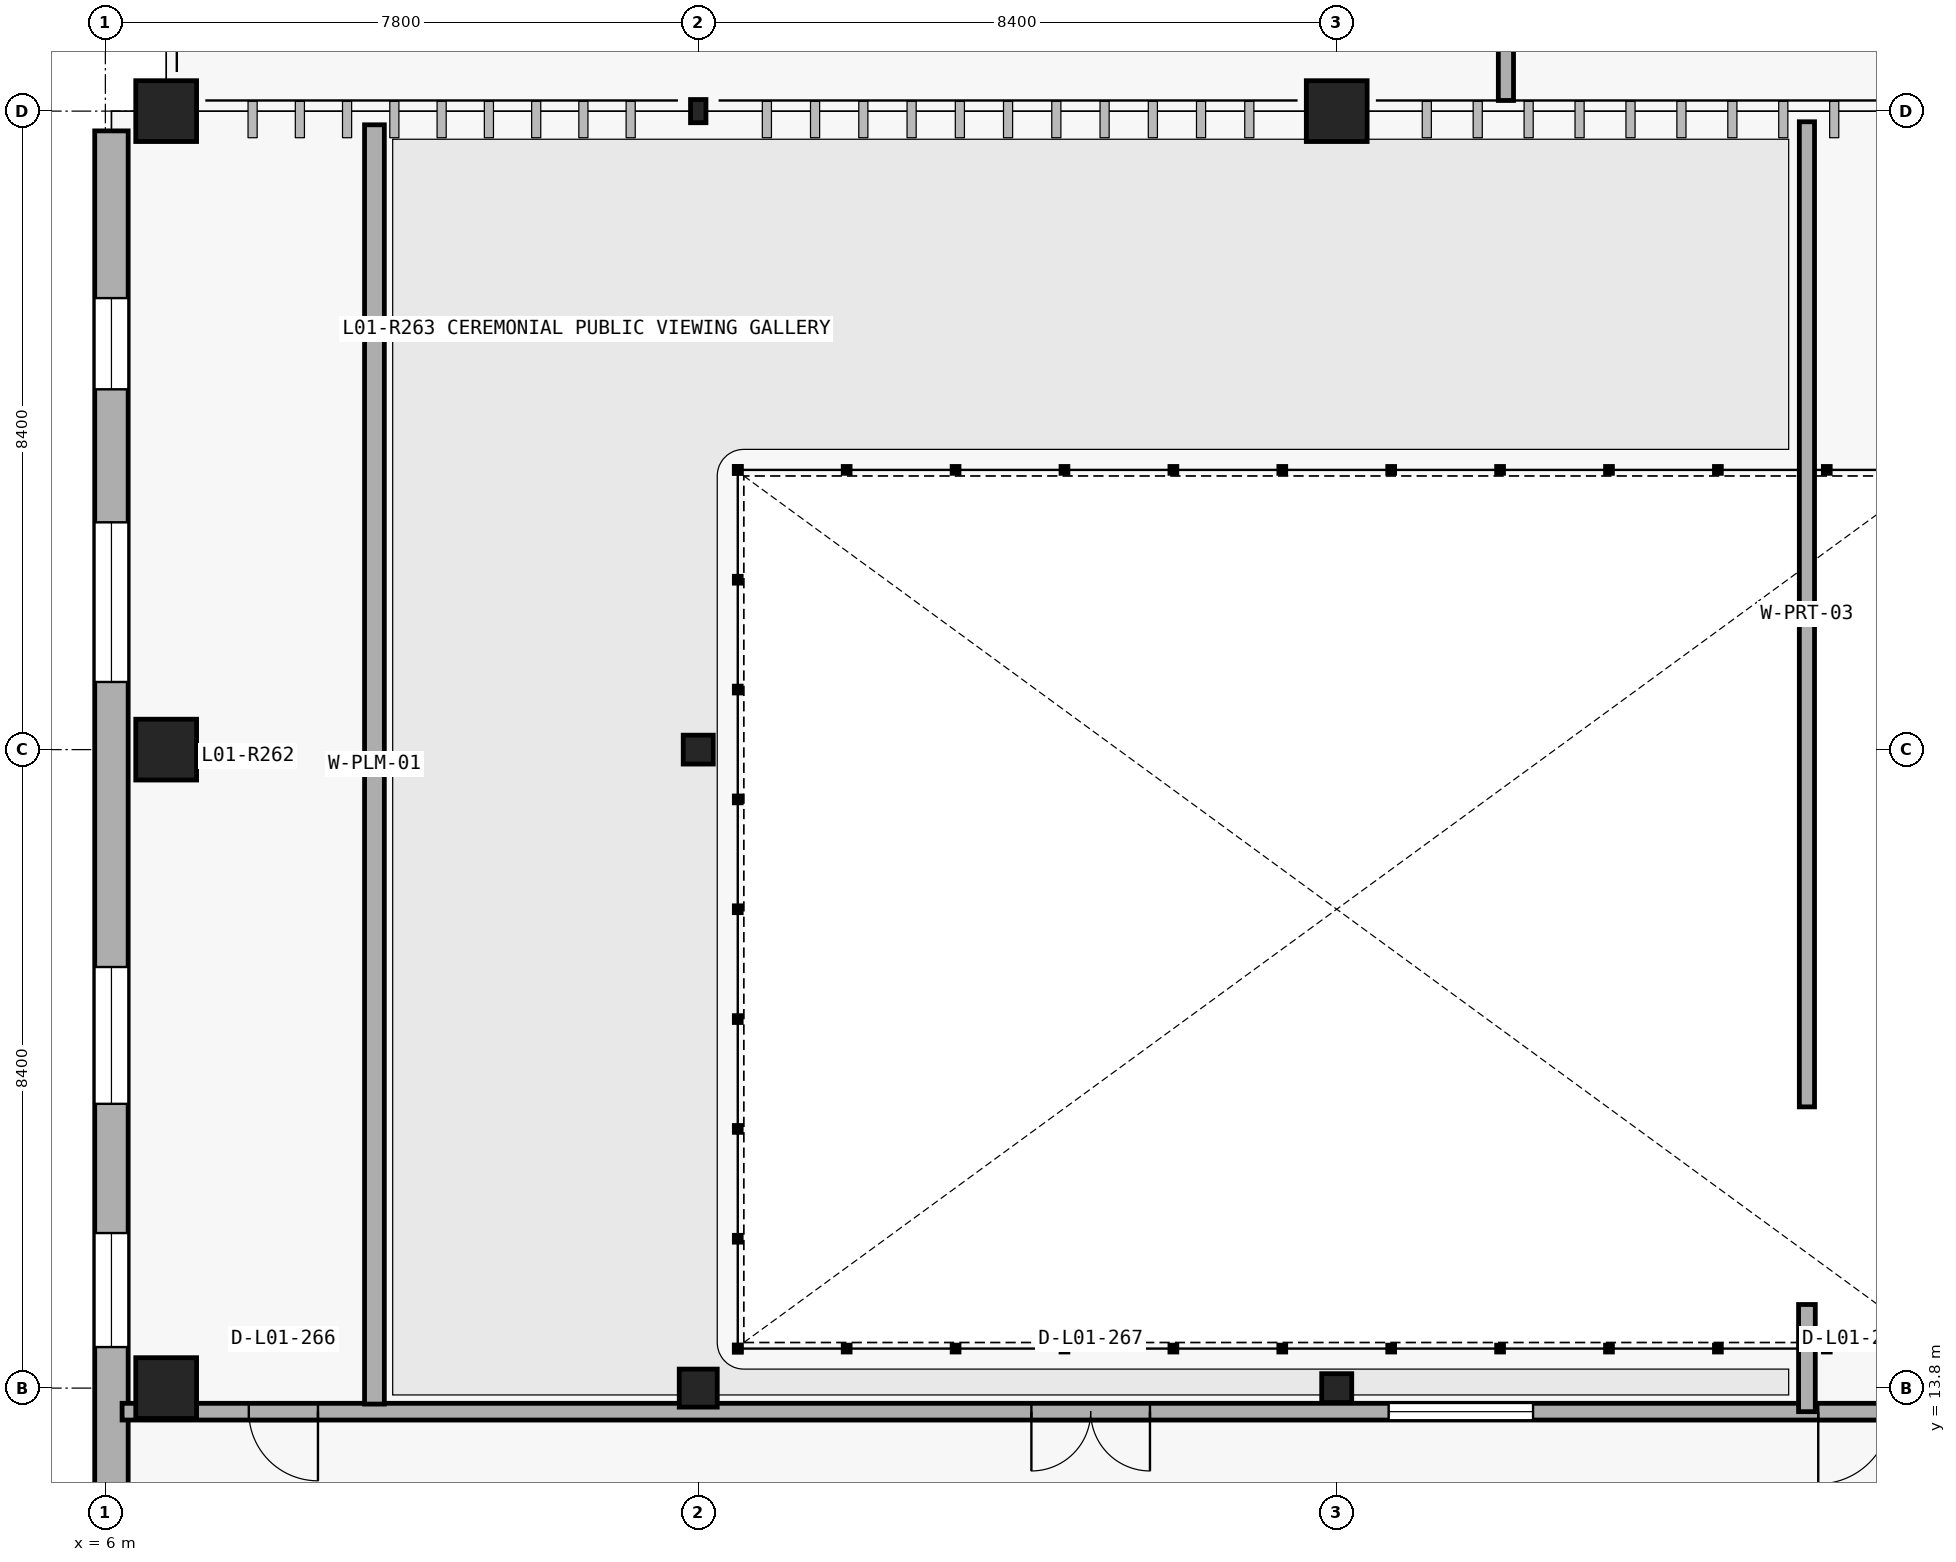
"""IFC4 building model, lengths in metres.
Left out: names, types, materials, properties, quantities, classifications, styles, units other than length and angle.
Written with IfcOpenShell. Run it as: python <this file> out.ifc"""

import sys

from ifc_helpers import new_model, si_unit, direction, frame, frame_2d, origin_with_axes, origin_2d_with_axis, place, context, subcontext, project, spatial, rectangle, hollow_rectangle, circle, i_section, extrude, element, fill, save


model = new_model("IFC4")
c1 = context("Model", 3, precision=1e-05, world=origin_with_axes(), true_north=direction((0.0, 1.0)))
c2 = subcontext(c1, "Body", "Model", "MODEL_VIEW")
j1 = project(units=[si_unit("LENGTHUNIT", "METRE"), si_unit("PLANEANGLEUNIT", "RADIAN")], contexts=[c1])
p1 = place(None, origin_with_axes())
s1 = spatial("IfcSite", under=j1, at=p1, CompositionType="ELEMENT")
p2 = place(p1, origin_with_axes())
s2 = spatial("IfcBuilding", under=s1, at=p2, CompositionType="ELEMENT")
p3 = place(p2, frame((0.0, 0.0, 5.4), z_axis=(0.0, 0.0, 1.0), x_axis=(1.0, 0.0, 0.0)))
s3 = spatial("IfcBuildingStorey", under=s2, at=p3, CompositionType="ELEMENT", Elevation=5.4)
p4 = place(None, frame((6.08, 30.34, 5.4), z_axis=(0.0, 0.0, 1.0), x_axis=(0.0, -1.0, 0.0)))
e1 = element("IfcWall", 1, at=p4, inside=s3, PredefinedType="SOLIDWALL", context=c2, shape_type="SweptSolid", body=[
    extrude(rectangle(XDim=24.0, YDim=0.44, at=frame_2d((12.0, 0.0), x_axis=(1.0, 0.0))), origin_with_axes(), (0.0, 0.0, 1.0), 5.1),
])
p5 = place(None, frame((6.08, 27.54, 6.5), z_axis=(0.0, 0.0, 1.0), x_axis=(0.0, -1.0, 0.0)))
e2 = element("IfcOpeningElement", 2, at=p5, cuts=e1, PredefinedType="OPENING", context=c2, shape_type="SweptSolid", body=[
    extrude(rectangle(XDim=1.2, YDim=3.4, at=frame_2d((0.0, 1.7), x_axis=(1.0, 0.0))), frame((0.0, 0.23, 0.0), z_axis=(0.0, -1.0, 0.0), x_axis=(1.0, 0.0, 0.0)), (0.0, 0.0, 1.0), 0.46),
])
p6 = place(None, frame((6.08, 24.14, 6.25), z_axis=(0.0, 0.0, 1.0), x_axis=(0.0, -1.0, 0.0)))
e3 = element("IfcOpeningElement", 3, at=p6, cuts=e1, PredefinedType="OPENING", context=c2, shape_type="SweptSolid", body=[
    extrude(rectangle(XDim=2.1, YDim=3.3, at=frame_2d((0.0, 1.65), x_axis=(1.0, 0.0))), frame((0.0, 0.23, 0.0), z_axis=(0.0, -1.0, 0.0), x_axis=(1.0, 0.0, 0.0)), (0.0, 0.0, 1.0), 0.46),
])
p7 = place(None, frame((6.08, 18.44, 6.3), z_axis=(0.0, 0.0, 1.0), x_axis=(0.0, -1.0, 0.0)))
e4 = element("IfcOpeningElement", 4, at=p7, cuts=e1, PredefinedType="OPENING", context=c2, shape_type="SweptSolid", body=[
    extrude(rectangle(XDim=1.8, YDim=3.0, at=frame_2d((0.0, 1.5), x_axis=(1.0, 0.0))), frame((0.0, 0.23, 0.0), z_axis=(0.0, -1.0, 0.0), x_axis=(1.0, 0.0, 0.0)), (0.0, 0.0, 1.0), 0.46),
])
p8 = place(None, frame((6.08, 15.09, 6.3), z_axis=(0.0, 0.0, 1.0), x_axis=(0.0, -1.0, 0.0)))
e5 = element("IfcOpeningElement", 5, at=p8, cuts=e1, PredefinedType="OPENING", context=c2, shape_type="SweptSolid", body=[
    extrude(rectangle(XDim=1.5, YDim=2.7, at=frame_2d((0.0, 1.35), x_axis=(1.0, 0.0))), frame((0.0, 0.23, 0.0), z_axis=(0.0, -1.0, 0.0), x_axis=(1.0, 0.0, 0.0)), (0.0, 0.0, 1.0), 0.46),
])
p9 = place(None, frame((6.22, 13.49, 5.4), z_axis=(0.0, 0.0, 1.0), x_axis=(1.0, 0.0, 0.0)))
e6 = element("IfcWall", 6, at=p9, inside=s3, PredefinedType="PARTITIONING", context=c2, shape_type="SweptSolid", body=[
    extrude(rectangle(XDim=25.037, YDim=0.22, at=frame_2d((12.518, 0.0), x_axis=(1.0, 0.0))), origin_with_axes(), (0.0, 0.0, 1.0), 5.08),
])
p10 = place(None, frame((8.342, 13.49, 5.4), z_axis=(0.0, 0.0, 1.0), x_axis=(1.0, 0.0, 0.0)))
e7 = element("IfcOpeningElement", 7, at=p10, cuts=e6, PredefinedType="OPENING", context=c2, shape_type="SweptSolid", body=[
    extrude(rectangle(XDim=0.91, YDim=2.12, at=frame_2d((0.0, 1.06), x_axis=(1.0, 0.0))), frame((0.0, 0.12, 0.0), z_axis=(0.0, -1.0, 0.0), x_axis=(1.0, 0.0, 0.0)), (0.0, 0.0, 1.0), 0.24),
])
p11 = place(None, frame((18.963, 13.49, 5.4), z_axis=(0.0, 0.0, 1.0), x_axis=(1.0, 0.0, 0.0)))
e8 = element("IfcOpeningElement", 8, at=p11, cuts=e6, PredefinedType="OPENING", context=c2, shape_type="SweptSolid", body=[
    extrude(rectangle(XDim=1.56, YDim=2.28, at=frame_2d((0.0, 1.14), x_axis=(1.0, 0.0))), frame((0.0, 0.12, 0.0), z_axis=(0.0, -1.0, 0.0), x_axis=(1.0, 0.0, 0.0)), (0.0, 0.0, 1.0), 0.24),
])
p12 = place(None, frame((29.01, 13.49, 5.4), z_axis=(0.0, 0.0, 1.0), x_axis=(1.0, 0.0, 0.0)))
e9 = element("IfcOpeningElement", 9, at=p12, cuts=e6, PredefinedType="OPENING", context=c2, shape_type="SweptSolid", body=[
    extrude(rectangle(XDim=0.95, YDim=2.16, at=frame_2d((0.0, 1.08), x_axis=(1.0, 0.0))), frame((0.0, 0.12, 0.0), z_axis=(0.0, -1.0, 0.0), x_axis=(1.0, 0.0, 0.0)), (0.0, 0.0, 1.0), 0.24),
])
p13 = place(None, frame((23.833, 13.49, 6.45), z_axis=(0.0, 0.0, 1.0), x_axis=(1.0, 0.0, 0.0)))
e10 = element("IfcOpeningElement", 10, at=p13, cuts=e6, PredefinedType="OPENING", context=c2, shape_type="SweptSolid", body=[
    extrude(rectangle(XDim=1.9, YDim=1.5, at=frame_2d((0.0, 0.75), x_axis=(1.0, 0.0))), frame((0.0, 0.12, 0.0), z_axis=(0.0, -1.0, 0.0), x_axis=(1.0, 0.0, 0.0)), (0.0, 0.0, 1.0), 0.24),
])
p14 = place(None, frame((9.54, 13.59, 5.4), z_axis=(0.0, 0.0, 1.0), x_axis=(0.0, 1.0, 0.0)))
e11 = element("IfcWall", 11, at=p14, inside=s3, PredefinedType="PLUMBINGWALL", context=c2, shape_type="SweptSolid", body=[
    extrude(rectangle(XDim=16.83, YDim=0.26, at=frame_2d((8.415, 0.0), x_axis=(1.0, 0.0))), origin_with_axes(), (0.0, 0.0, 1.0), 5.08),
])
p15 = place(None, frame((28.386, 13.49, 5.4), z_axis=(0.0, 0.0, 1.0), x_axis=(0.0, 1.0, 0.0)))
e12 = element("IfcWall", 12, at=p15, inside=s3, PredefinedType="PARTITIONING", context=c2, shape_type="SweptSolid", body=[
    extrude(rectangle(XDim=1.41, YDim=0.22, at=frame_2d((0.705, 0.0), x_axis=(1.0, 0.0))), origin_with_axes(), (0.0, 0.0, 1.0), 5.08),
])
p16 = place(None, frame((28.386, 17.5, 5.4), z_axis=(0.0, 0.0, 1.0), x_axis=(0.0, 1.0, 0.0)))
e13 = element("IfcWall", 13, at=p16, inside=s3, PredefinedType="PARTITIONING", context=c2, shape_type="SweptSolid", body=[
    extrude(rectangle(XDim=12.96, YDim=0.2, at=frame_2d((6.48, 0.0), x_axis=(1.0, 0.0))), origin_with_axes(), (0.0, 0.0, 1.0), 5.08),
])
p17 = place(None, frame((24.426, 30.74, 5.4), z_axis=(0.0, 0.0, 1.0), x_axis=(0.0, 1.0, 0.0)))
e14 = element("IfcWall", 14, at=p17, inside=s3, PredefinedType="PARTITIONING", context=c2, shape_type="SweptSolid", body=[
    extrude(rectangle(XDim=4.51, YDim=0.2, at=frame_2d((2.255, 0.0), x_axis=(1.0, 0.0))), origin_with_axes(), (0.0, 0.0, 1.0), 5.08),
])
for number, where, z_axis, x_axis in (
    (15, (6.8, 13.8, 5.4), (0.0, 0.0, 1.0), (1.0, 0.0, 0.0)),
    (16, (6.8, 22.2, 5.4), (0.0, 0.0, 1.0), (1.0, 0.0, 0.0)),
    (17, (6.8, 30.6, 5.4), (0.0, 0.0, 1.0), (1.0, 0.0, 0.0)),
):
    element("IfcColumn", number, at=place(None, frame(where, z_axis=z_axis, x_axis=x_axis)), inside=s3, PredefinedType="COLUMN", context=c2, shape_type="SweptSolid", body=[
        extrude(circle(Radius=0.4, at=origin_2d_with_axis()), origin_with_axes(), (0.0, 0.0, 1.0), 5.4),
    ])
p18 = place(None, frame((13.8, 13.8, 5.4), z_axis=(0.0, 0.0, 1.0), x_axis=(1.0, 0.0, 0.0)))
e18 = element("IfcColumn", 18, at=p18, inside=s3, PredefinedType="COLUMN", context=c2, shape_type="SweptSolid", body=[
    extrude(i_section(OverallWidth=0.5, OverallDepth=0.5, WebThickness=0.022, FlangeThickness=0.036, at=origin_2d_with_axis()), origin_with_axes(), (0.0, 0.0, 1.0), 5.4),
])
p19 = place(None, frame((13.8, 22.2, 5.4), z_axis=(0.0, 0.0, 1.0), x_axis=(1.0, 0.0, 0.0)))
e19 = element("IfcColumn", 19, at=p19, inside=s3, PredefinedType="COLUMN", context=c2, shape_type="SweptSolid", body=[
    extrude(i_section(OverallWidth=0.395, OverallDepth=0.38, WebThickness=0.019, FlangeThickness=0.03, at=origin_2d_with_axis()), origin_with_axes(), (0.0, 0.0, 1.0), 5.4),
])
p20 = place(None, frame((13.8, 30.6, 5.4), z_axis=(0.0, 0.0, 1.0), x_axis=(1.0, 0.0, 0.0)))
e20 = element("IfcColumn", 20, at=p20, inside=s3, PredefinedType="COLUMN", context=c2, shape_type="SweptSolid", body=[
    extrude(hollow_rectangle(XDim=0.203, YDim=0.305, WallThickness=0.013, InnerFilletRadius=0.025, OuterFilletRadius=0.013, at=origin_2d_with_axis()), origin_with_axes(), (0.0, 0.0, 1.0), 5.4),
])
p21 = place(None, frame((22.2, 13.8, 5.4), z_axis=(0.0, 0.0, 1.0), x_axis=(1.0, 0.0, 0.0)))
e21 = element("IfcColumn", 21, at=p21, inside=s3, PredefinedType="COLUMN", context=c2, shape_type="SweptSolid", body=[
    extrude(i_section(OverallWidth=0.395, OverallDepth=0.38, WebThickness=0.019, FlangeThickness=0.03, at=origin_2d_with_axis()), origin_with_axes(), (0.0, 0.0, 1.0), 5.4),
])
p22 = place(None, frame((22.2, 30.6, 5.4), z_axis=(0.0, 0.0, 1.0), x_axis=(1.0, 0.0, 0.0)))
e22 = element("IfcColumn", 22, at=p22, inside=s3, PredefinedType="COLUMN", context=c2, shape_type="SweptSolid", body=[
    extrude(circle(Radius=0.4, at=origin_2d_with_axis()), origin_with_axes(), (0.0, 0.0, 1.0), 5.4),
])
p23 = place(None, frame((8.342, 13.49, 5.4), z_axis=(0.0, 0.0, 1.0), x_axis=(-1.0, 0.0, 0.0)))
e23 = element("IfcDoor", 23, at=p23, inside=s3, OperationType="SINGLE_SWING_RIGHT", PredefinedType="DOOR", context=c2, shape_type="SweptSolid", body=[
    extrude(rectangle(XDim=0.91, YDim=2.12, at=frame_2d((0.0, 1.06), x_axis=(1.0, 0.0))), frame((0.0, 0.04, 0.0), z_axis=(0.0, -1.0, 0.0), x_axis=(1.0, 0.0, 0.0)), (0.0, 0.0, 1.0), 0.08),
])
fill(e7, e23)
p24 = place(None, frame((18.963, 13.49, 5.4), z_axis=(0.0, 0.0, 1.0), x_axis=(-1.0, 0.0, 0.0)))
e24 = element("IfcDoor", 24, at=p24, inside=s3, OperationType="DOUBLE_DOOR_SINGLE_SWING", PredefinedType="DOOR", context=c2, shape_type="SweptSolid", body=[
    extrude(rectangle(XDim=1.56, YDim=2.28, at=frame_2d((0.0, 1.14), x_axis=(1.0, 0.0))), frame((0.0, 0.04, 0.0), z_axis=(0.0, -1.0, 0.0), x_axis=(1.0, 0.0, 0.0)), (0.0, 0.0, 1.0), 0.08),
])
fill(e8, e24)
p25 = place(None, frame((29.01, 13.49, 5.4), z_axis=(0.0, 0.0, 1.0), x_axis=(-1.0, 0.0, 0.0)))
e25 = element("IfcDoor", 25, at=p25, inside=s3, OperationType="SINGLE_SWING_LEFT", PredefinedType="DOOR", context=c2, shape_type="SweptSolid", body=[
    extrude(rectangle(XDim=0.95, YDim=2.16, at=frame_2d((0.0, 1.08), x_axis=(1.0, 0.0))), frame((0.0, 0.04, 0.0), z_axis=(0.0, -1.0, 0.0), x_axis=(1.0, 0.0, 0.0)), (0.0, 0.0, 1.0), 0.08),
])
fill(e9, e25)
p26 = place(None, frame((6.08, 27.54, 6.5), z_axis=(0.0, 0.0, 1.0), x_axis=(0.0, -1.0, 0.0)))
e26 = element("IfcWindow", 26, at=p26, inside=s3, PartitioningType="SINGLE_PANEL", PredefinedType="WINDOW", context=c2, shape_type="SweptSolid", body=[
    extrude(rectangle(XDim=1.2, YDim=3.4, at=frame_2d((0.0, 1.7), x_axis=(1.0, 0.0))), frame((0.0, 0.03, 0.0), z_axis=(0.0, -1.0, 0.0), x_axis=(1.0, 0.0, 0.0)), (0.0, 0.0, 1.0), 0.06),
])
fill(e2, e26)
p27 = place(None, frame((6.08, 24.14, 6.25), z_axis=(0.0, 0.0, 1.0), x_axis=(0.0, -1.0, 0.0)))
e27 = element("IfcWindow", 27, at=p27, inside=s3, PartitioningType="SINGLE_PANEL", PredefinedType="WINDOW", context=c2, shape_type="SweptSolid", body=[
    extrude(rectangle(XDim=2.1, YDim=3.3, at=frame_2d((0.0, 1.65), x_axis=(1.0, 0.0))), frame((0.0, 0.03, 0.0), z_axis=(0.0, -1.0, 0.0), x_axis=(1.0, 0.0, 0.0)), (0.0, 0.0, 1.0), 0.06),
])
fill(e3, e27)
p28 = place(None, frame((6.08, 18.44, 6.3), z_axis=(0.0, 0.0, 1.0), x_axis=(0.0, -1.0, 0.0)))
e28 = element("IfcWindow", 28, at=p28, inside=s3, PartitioningType="SINGLE_PANEL", PredefinedType="WINDOW", context=c2, shape_type="SweptSolid", body=[
    extrude(rectangle(XDim=1.8, YDim=3.0, at=frame_2d((0.0, 1.5), x_axis=(1.0, 0.0))), frame((0.0, 0.03, 0.0), z_axis=(0.0, -1.0, 0.0), x_axis=(1.0, 0.0, 0.0)), (0.0, 0.0, 1.0), 0.06),
])
fill(e4, e28)
p29 = place(None, frame((6.08, 15.09, 6.3), z_axis=(0.0, 0.0, 1.0), x_axis=(0.0, -1.0, 0.0)))
e29 = element("IfcWindow", 29, at=p29, inside=s3, PartitioningType="SINGLE_PANEL", PredefinedType="WINDOW", context=c2, shape_type="SweptSolid", body=[
    extrude(rectangle(XDim=1.5, YDim=2.7, at=frame_2d((0.0, 1.35), x_axis=(1.0, 0.0))), frame((0.0, 0.03, 0.0), z_axis=(0.0, -1.0, 0.0), x_axis=(1.0, 0.0, 0.0)), (0.0, 0.0, 1.0), 0.06),
])
fill(e5, e29)
p30 = place(None, frame((23.833, 13.49, 6.45), z_axis=(0.0, 0.0, 1.0), x_axis=(1.0, 0.0, 0.0)))
e30 = element("IfcWindow", 30, at=p30, inside=s3, PartitioningType="SINGLE_PANEL", PredefinedType="WINDOW", context=c2, shape_type="SweptSolid", body=[
    extrude(rectangle(XDim=1.9, YDim=1.5, at=frame_2d((0.0, 0.75), x_axis=(1.0, 0.0))), frame((0.0, 0.03, 0.0), z_axis=(0.0, -1.0, 0.0), x_axis=(1.0, 0.0, 0.0)), (0.0, 0.0, 1.0), 0.06),
])
fill(e10, e30)
save(model, sys.argv[1])
